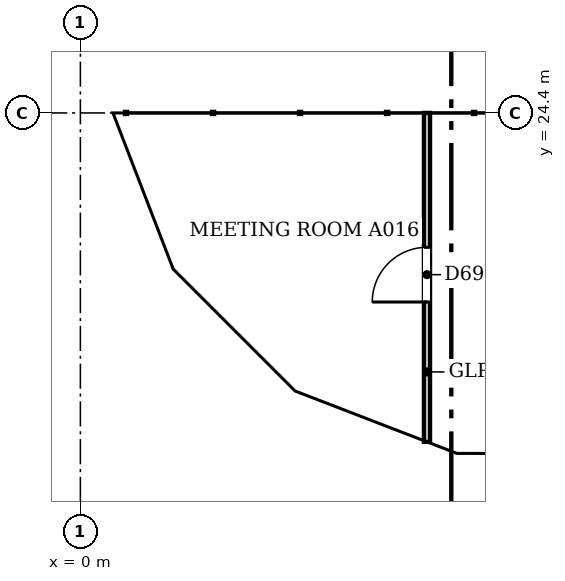
"""IFC4 building model, lengths in metres.
Left out: names, types, materials, properties, quantities, classifications, styles, units other than length and angle.
Written with IfcOpenShell. Run it as: python <this file> out.ifc"""

import sys

from ifc_helpers import new_model, si_unit, direction, frame, frame_2d, origin, place, context, subcontext, project, spatial, polyline, rectangle, outline, extrude, faceted_brep, source, transform, mapped, element, fill, save


model = new_model("IFC4")
c1 = context("Model", 3, precision=1e-05, world=origin(), true_north=direction((0.0, 1.0)))
c2 = subcontext(c1, "Body", "Model", "MODEL_VIEW")
j1 = project(units=[si_unit("LENGTHUNIT", "METRE"), si_unit("PLANEANGLEUNIT", "RADIAN")], contexts=[c1])
p1 = place(None, origin())
s1 = spatial("IfcSite", under=j1, at=p1, CompositionType="ELEMENT")
p2 = place(p1, origin())
s2 = spatial("IfcBuilding", under=s1, at=p2, CompositionType="ELEMENT")
p3 = place(p2, frame((0.0, 0.0, 124.0)))
s3 = spatial("IfcBuildingStorey", under=s2, at=p3, CompositionType="ELEMENT", Elevation=124.0)
m1 = source(origin(), c2, "Body", "Brep", [
    faceted_brep([(3.003, -0.25, 0.0), (3.05, -0.25, 0.06), (3.05, -0.25, 7.54), (3.003, -0.25, 7.6), (0.0, -0.25, 3.8), (0.0, 0.25, 3.8), (2.957, 0.25, 7.541), (2.957, 0.25, 0.059), (3.003, 0.0, 0.0), (3.003, 0.0, 7.6)], [[[0, 1, 2, 3, 4]], [[5, 6, 7]], [[1, 0, 8]], [[9, 3, 2]], [[6, 5, 4, 3, 9]], [[5, 7, 8, 0, 4]], [[1, 8, 7, 6, 9, 2]]]),
])
p4 = place(p3, frame((0.25, 27.45, -3.8), z_axis=(0.0, 0.0, 1.0), x_axis=(0.0, -1.0, 0.0)))
e1 = element("IfcWall", 1, at=p4, inside=s3, PredefinedType="SOLIDWALL", context=c2, shape_type="MappedRepresentation", body=[
    mapped(m1, transform((0.0, 0.0, 0.0), scale=1.0)),
])
m2 = source(origin(), c2, "Body", "SweptSolid", [
    extrude(outline(polyline([(2.803, 6.944), (0.319, 3.8), (2.803, 0.656), (2.803, 6.944)])), frame((0.0, 0.26, 0.0), z_axis=(0.0, -1.0, 0.0), x_axis=(1.0, 0.0, 0.0)), (0.0, 0.0, 1.0), 0.52),
])
p5 = place(p4, origin())
e2 = element("IfcOpeningElement", 2, at=p5, cuts=e1, PredefinedType="OPENING", context=c2, shape_type="MappedRepresentation", body=[
    mapped(m2, transform((0.0, 0.0, 0.0), scale=1.0)),
])
m3 = source(origin(), c2, "Body", "Brep", [
    faceted_brep([(0.047, -0.25, 0.0), (2.997, -0.25, 3.8), (0.047, -0.25, 7.6), (0.0, -0.25, 7.541), (0.0, -0.25, 0.059), (0.093, 0.25, 7.54), (2.944, 0.25, 3.868), (2.944, 0.25, 3.732), (0.093, 0.25, 0.06), (2.997, 0.0, 3.8), (0.047, 0.0, 0.0), (0.047, 0.0, 7.6)], [[[0, 1, 2, 3, 4]], [[5, 6, 7, 8]], [[8, 7, 9, 1, 0, 10]], [[6, 5, 11, 2, 1, 9]], [[3, 2, 11]], [[10, 0, 4]], [[8, 10, 4, 3, 11, 5]], [[9, 7, 6]]]),
])
p6 = place(p3, frame((0.233, 24.49, -3.8), z_axis=(0.0, 0.0, 1.0), x_axis=(0.359901446078, -0.932990326376, 0.0)))
e3 = element("IfcWall", 3, at=p6, inside=s3, PredefinedType="SOLIDWALL", context=c2, shape_type="MappedRepresentation", body=[
    mapped(m3, transform((0.0, 0.0, 0.0), scale=1.0)),
])
m4 = source(origin(), c2, "Body", "SweptSolid", [
    extrude(outline(polyline([(0.247, 0.665), (2.681, 3.8), (0.247, 6.935), (0.247, 0.665)])), frame((0.0, 0.26, 0.0), z_axis=(0.0, -1.0, 0.0), x_axis=(1.0, 0.0, 0.0)), (0.0, 0.0, 1.0), 0.52),
])
p7 = place(p6, origin())
e4 = element("IfcOpeningElement", 4, at=p7, cuts=e3, PredefinedType="OPENING", context=c2, shape_type="MappedRepresentation", body=[
    mapped(m4, transform((0.0, 0.0, 0.0), scale=1.0)),
])
m5 = source(origin(), c2, "Body", "Brep", [
    faceted_brep([(2.944, -0.25, 0.0), (2.997, -0.25, 0.068), (2.997, -0.25, 7.532), (2.944, -0.25, 7.6), (0.0, -0.25, 3.8), (0.053, 0.25, 3.868), (2.891, 0.25, 7.532), (2.891, 0.25, 0.068), (0.053, 0.25, 3.732), (2.944, 0.0, 0.0), (2.944, 0.0, 7.6), (0.0, 0.0, 3.8)], [[[0, 1, 2, 3, 4]], [[5, 6, 7, 8]], [[1, 0, 9]], [[10, 3, 2]], [[6, 5, 11, 4, 3, 10]], [[8, 7, 9, 0, 4, 11]], [[8, 11, 5]], [[1, 9, 7, 6, 10, 2]]]),
])
p8 = place(p3, frame((1.312, 21.694, -3.8), z_axis=(0.0, 0.0, 1.0), x_axis=(0.707066050402, -0.707147509625, 0.0)))
e5 = element("IfcWall", 5, at=p8, inside=s3, PredefinedType="SOLIDWALL", context=c2, shape_type="MappedRepresentation", body=[
    mapped(m5, transform((0.0, 0.0, 0.0), scale=1.0)),
])
m6 = source(origin(), c2, "Body", "SweptSolid", [
    extrude(outline(polyline([(2.744, 6.934), (0.316, 3.8), (2.744, 0.666), (2.744, 6.934)])), frame((0.0, 0.26, 0.0), z_axis=(0.0, -1.0, 0.0), x_axis=(1.0, 0.0, 0.0)), (0.0, 0.0, 1.0), 0.52),
])
p9 = place(p8, origin())
e6 = element("IfcOpeningElement", 6, at=p9, cuts=e5, PredefinedType="OPENING", context=c2, shape_type="MappedRepresentation", body=[
    mapped(m6, transform((0.0, 0.0, 0.0), scale=1.0)),
])
m7 = source(origin(), c2, "Body", "Brep", [
    faceted_brep([(0.053, -0.25, 0.0), (3.003, -0.25, 3.8), (0.053, -0.25, 7.6), (0.0, -0.25, 7.532), (0.0, -0.25, 0.068), (0.106, 0.25, 7.532), (2.957, 0.25, 3.86), (2.957, 0.25, 3.74), (0.106, 0.25, 0.068), (3.003, 0.0, 3.8), (0.053, 0.0, 0.0), (0.053, 0.0, 7.6)], [[[0, 1, 2, 3, 4]], [[5, 6, 7, 8]], [[8, 7, 9, 1, 0, 10]], [[6, 5, 11, 2, 1, 9]], [[3, 2, 11]], [[10, 0, 4]], [[8, 10, 4, 3, 11, 5]], [[9, 7, 6]]]),
])
p10 = place(p3, frame((3.344, 19.631, -3.8), z_axis=(0.0, 0.0, 1.0), x_axis=(0.933007896601, -0.359855894603, 0.0)))
e7 = element("IfcWall", 7, at=p10, inside=s3, PredefinedType="SOLIDWALL", context=c2, shape_type="MappedRepresentation", body=[
    mapped(m7, transform((0.0, 0.0, 0.0), scale=1.0)),
])
m8 = source(origin(), c2, "Body", "SweptSolid", [
    extrude(outline(polyline([(0.253, 0.665), (2.687, 3.8), (0.253, 6.935), (0.253, 0.665)])), frame((0.0, 0.26, 0.0), z_axis=(0.0, -1.0, 0.0), x_axis=(1.0, 0.0, 0.0)), (0.0, 0.0, 1.0), 0.52),
])
p11 = place(p10, origin())
e8 = element("IfcOpeningElement", 8, at=p11, cuts=e7, PredefinedType="OPENING", context=c2, shape_type="MappedRepresentation", body=[
    mapped(m8, transform((0.0, 0.0, 0.0), scale=1.0)),
])
m9 = source(origin(), c2, "Body", "Brep", [
    faceted_brep([(3.003, -0.25, 0.0), (6.053, -0.25, 3.8), (3.003, -0.25, 7.6), (0.0, -0.25, 3.8), (0.047, 0.25, 3.859), (3.003, 0.25, 7.6), (6.053, 0.25, 3.8), (3.003, 0.25, 0.0), (0.047, 0.25, 3.741), (0.0, 0.0, 3.8)], [[[0, 1, 2, 3]], [[4, 5, 6, 7, 8]], [[7, 6, 1, 0]], [[6, 5, 2, 1]], [[5, 4, 9, 3, 2]], [[8, 7, 0, 3, 9]], [[8, 9, 4]]]),
])
p12 = place(p3, frame((6.146, 18.55, -3.8), z_axis=(0.0, 0.0, 1.0), x_axis=(1.0, 0.0, 0.0)))
e9 = element("IfcWall", 9, at=p12, inside=s3, PredefinedType="SOLIDWALL", context=c2, shape_type="MappedRepresentation", body=[
    mapped(m9, transform((0.0, 0.0, 0.0), scale=1.0)),
])
m10 = source(origin(), c2, "Body", "SweptSolid", [
    extrude(outline(polyline([(3.005, 0.401), (5.733, 3.8), (3.005, 7.199), (0.319, 3.8), (3.005, 0.401)])), frame((0.0, 0.26, 0.0), z_axis=(0.0, -1.0, 0.0), x_axis=(1.0, 0.0, 0.0)), (0.0, 0.0, 1.0), 0.52),
])
p13 = place(p12, origin())
e10 = element("IfcOpeningElement", 10, at=p13, cuts=e9, PredefinedType="OPENING", context=c2, shape_type="MappedRepresentation", body=[
    mapped(m10, transform((0.0, 0.0, 0.0), scale=1.0)),
])
p14 = place(p2, frame((0.0, 0.0, 127.8)))
s4 = spatial("IfcBuildingStorey", under=s2, at=p14, CompositionType="ELEMENT", Elevation=127.8)
m11 = source(origin(), c2, "Body", "Brep", [
    faceted_brep([(3.05, -0.25, 0.0), (6.053, -0.25, 3.8), (3.05, -0.25, 7.6), (0.0, -0.25, 3.8), (0.0, 0.25, 3.8), (3.05, 0.25, 7.6), (6.007, 0.25, 3.859), (6.007, 0.25, 3.741), (3.05, 0.25, 0.0), (6.053, 0.0, 3.8)], [[[0, 1, 2, 3]], [[4, 5, 6, 7, 8]], [[8, 7, 9, 1, 0]], [[6, 5, 2, 1, 9]], [[5, 4, 3, 2]], [[4, 8, 0, 3]], [[9, 7, 6]]]),
])
p15 = place(p14, frame((0.25, 30.5, -3.8), z_axis=(0.0, 0.0, 1.0), x_axis=(0.0, -1.0, 0.0)))
e11 = element("IfcWall", 11, at=p15, inside=s4, PredefinedType="SOLIDWALL", context=c2, shape_type="MappedRepresentation", body=[
    mapped(m11, transform((0.0, 0.0, 0.0), scale=1.0)),
])
m12 = source(origin(), c2, "Body", "SweptSolid", [
    extrude(outline(polyline([(3.049, 0.401), (5.735, 3.8), (3.049, 7.199), (0.321, 3.8), (3.049, 0.401)])), frame((0.0, 0.26, 0.0), z_axis=(0.0, -1.0, 0.0), x_axis=(1.0, 0.0, 0.0)), (0.0, 0.0, 1.0), 0.52),
])
p16 = place(p15, origin())
e12 = element("IfcOpeningElement", 12, at=p16, cuts=e11, PredefinedType="OPENING", context=c2, shape_type="MappedRepresentation", body=[
    mapped(m12, transform((0.0, 0.0, 0.0), scale=1.0)),
])
m13 = source(origin(), c2, "Body", "Brep", [
    faceted_brep([(2.95, -0.25, 0.0), (3.003, -0.25, 0.068), (3.003, -0.25, 7.532), (2.95, -0.25, 7.6), (0.0, -0.25, 3.8), (0.047, 0.25, 3.86), (2.898, 0.25, 7.532), (2.898, 0.25, 0.068), (0.047, 0.25, 3.74), (2.95, 0.0, 0.0), (2.95, 0.0, 7.6), (0.0, 0.0, 3.8)], [[[0, 1, 2, 3, 4]], [[5, 6, 7, 8]], [[1, 0, 9]], [[10, 3, 2]], [[6, 5, 11, 4, 3, 10]], [[8, 7, 9, 0, 4, 11]], [[8, 11, 5]], [[1, 9, 7, 6, 10, 2]]]),
])
p17 = place(p14, frame((0.25, 24.447, -3.8), z_axis=(0.0, 0.0, 1.0), x_axis=(0.35992665181, -0.932980602862, 0.0)))
e13 = element("IfcWall", 13, at=p17, inside=s4, PredefinedType="SOLIDWALL", context=c2, shape_type="MappedRepresentation", body=[
    mapped(m13, transform((0.0, 0.0, 0.0), scale=1.0)),
])
m14 = source(origin(), c2, "Body", "SweptSolid", [
    extrude(outline(polyline([(2.75, 6.935), (0.316, 3.8), (2.75, 0.665), (2.75, 6.935)])), frame((0.0, 0.26, 0.0), z_axis=(0.0, -1.0, 0.0), x_axis=(1.0, 0.0, 0.0)), (0.0, 0.0, 1.0), 0.52),
])
p18 = place(p17, origin())
e14 = element("IfcOpeningElement", 14, at=p18, cuts=e13, PredefinedType="OPENING", context=c2, shape_type="MappedRepresentation", body=[
    mapped(m14, transform((0.0, 0.0, 0.0), scale=1.0)),
])
m15 = source(origin(), c2, "Body", "Brep", [
    faceted_brep([(0.053, -0.25, 0.0), (2.997, -0.25, 3.8), (0.053, -0.25, 7.6), (0.0, -0.25, 7.532), (0.0, -0.25, 0.068), (0.106, 0.25, 7.532), (2.944, 0.25, 3.868), (2.944, 0.25, 3.732), (0.106, 0.25, 0.068), (2.997, 0.0, 3.8), (0.053, 0.0, 0.0), (0.053, 0.0, 7.6)], [[[0, 1, 2, 3, 4]], [[5, 6, 7, 8]], [[8, 7, 9, 1, 0, 10]], [[6, 5, 11, 2, 1, 9]], [[3, 2, 11]], [[10, 0, 4]], [[8, 10, 4, 3, 11, 5]], [[9, 7, 6]]]),
])
p19 = place(p14, frame((1.274, 21.731, -3.8), z_axis=(0.0, 0.0, 1.0), x_axis=(0.707147509625, -0.707066050402, 0.0)))
e15 = element("IfcWall", 15, at=p19, inside=s4, PredefinedType="SOLIDWALL", context=c2, shape_type="MappedRepresentation", body=[
    mapped(m15, transform((0.0, 0.0, 0.0), scale=1.0)),
])
m16 = source(origin(), c2, "Body", "SweptSolid", [
    extrude(outline(polyline([(0.253, 0.666), (2.681, 3.8), (0.253, 6.934), (0.253, 0.666)])), frame((0.0, 0.26, 0.0), z_axis=(0.0, -1.0, 0.0), x_axis=(1.0, 0.0, 0.0)), (0.0, 0.0, 1.0), 0.52),
])
p20 = place(p19, origin())
e16 = element("IfcOpeningElement", 16, at=p20, cuts=e15, PredefinedType="OPENING", context=c2, shape_type="MappedRepresentation", body=[
    mapped(m16, transform((0.0, 0.0, 0.0), scale=1.0)),
])
m17 = source(origin(), c2, "Body", "Brep", [
    faceted_brep([(2.95, -0.25, 0.0), (2.997, -0.25, 0.059), (2.997, -0.25, 7.541), (2.95, -0.25, 7.6), (0.0, -0.25, 3.8), (0.053, 0.25, 3.868), (2.904, 0.25, 7.54), (2.904, 0.25, 0.06), (0.053, 0.25, 3.732), (2.95, 0.0, 0.0), (2.95, 0.0, 7.6), (0.0, 0.0, 3.8)], [[[0, 1, 2, 3, 4]], [[5, 6, 7, 8]], [[1, 0, 9]], [[10, 3, 2]], [[6, 5, 11, 4, 3, 10]], [[8, 7, 9, 0, 4, 11]], [[8, 11, 5]], [[1, 9, 7, 6, 10, 2]]]),
])
p21 = place(p14, frame((3.394, 19.612, -3.8), z_axis=(0.0, 0.0, 1.0), x_axis=(0.932990326376, -0.359901446078, 0.0)))
e17 = element("IfcWall", 17, at=p21, inside=s4, PredefinedType="SOLIDWALL", context=c2, shape_type="MappedRepresentation", body=[
    mapped(m17, transform((0.0, 0.0, 0.0), scale=1.0)),
])
p22 = place(p21, origin())
e18 = element("IfcOpeningElement", 18, at=p22, cuts=e17, PredefinedType="OPENING", context=c2, shape_type="MappedRepresentation", body=[
    mapped(m14, transform((0.0, 0.0, 0.0), scale=1.0)),
])
m18 = source(origin(), c2, "Body", "Brep", [
    faceted_brep([(0.047, -0.25, 0.0), (3.05, -0.25, 3.8), (0.047, -0.25, 7.6), (0.0, -0.25, 7.54), (0.0, -0.25, 0.06), (0.093, 0.25, 7.541), (3.05, 0.25, 3.8), (0.093, 0.25, 0.059), (0.047, 0.0, 0.0), (0.047, 0.0, 7.6)], [[[0, 1, 2, 3, 4]], [[5, 6, 7]], [[7, 6, 1, 0, 8]], [[6, 5, 9, 2, 1]], [[3, 2, 9]], [[8, 0, 4]], [[7, 8, 4, 3, 9, 5]]]),
])
p23 = place(p14, frame((6.1, 18.55, -3.8), z_axis=(0.0, 0.0, 1.0), x_axis=(1.0, 0.0, 0.0)))
e19 = element("IfcWall", 19, at=p23, inside=s4, PredefinedType="SOLIDWALL", context=c2, shape_type="MappedRepresentation", body=[
    mapped(m18, transform((0.0, 0.0, 0.0), scale=1.0)),
])
m19 = source(origin(), c2, "Body", "SweptSolid", [
    extrude(outline(polyline([(0.247, 0.656), (2.731, 3.8), (0.247, 6.944), (0.247, 0.656)])), frame((0.0, 0.26, 0.0), z_axis=(0.0, -1.0, 0.0), x_axis=(1.0, 0.0, 0.0)), (0.0, 0.0, 1.0), 0.52),
])
p24 = place(p23, origin())
e20 = element("IfcOpeningElement", 20, at=p24, cuts=e19, PredefinedType="OPENING", context=c2, shape_type="MappedRepresentation", body=[
    mapped(m19, transform((0.0, 0.0, 0.0), scale=1.0)),
])
p25 = place(p3, frame((5.7, 18.99, 0.0), z_axis=(0.0, 0.0, 1.0), x_axis=(0.0, 1.0, 0.0)))
e21 = element("IfcWall", 21, at=p25, inside=s3, PredefinedType="PARTITIONING", context=c2, shape_type="SweptSolid", body=[
    extrude(rectangle(XDim=5.41, YDim=0.1, at=frame_2d((2.705, 0.0))), origin(), (0.0, 0.0, 1.0), 3.067),
])
m20 = source(origin(), c2, "Body", "SweptSolid", [
    extrude(rectangle(XDim=0.9, YDim=2.1, at=frame_2d((0.45, 1.05))), frame((0.0, 0.06, 0.0), z_axis=(0.0, -1.0, 0.0), x_axis=(1.0, 0.0, 0.0)), (0.0, 0.0, 1.0), 0.12),
])
p26 = place(p25, frame((2.3, 0.0, 0.0)))
e22 = element("IfcOpeningElement", 22, at=p26, cuts=e21, PredefinedType="OPENING", context=c2, shape_type="MappedRepresentation", body=[
    mapped(m20, transform((0.0, 0.0, 0.0), scale=1.0)),
])
m21 = source(origin(), c2, "Body", "SweptSolid", [
    extrude(rectangle(XDim=0.9, YDim=2.1, at=frame_2d((0.45, 1.05))), frame((0.0, 0.025, 0.0), z_axis=(0.0, -1.0, 0.0), x_axis=(1.0, 0.0, 0.0)), (0.0, 0.0, 1.0), 0.05),
])
p27 = place(p26, origin())
e23 = element("IfcDoor", 23, at=p27, inside=s3, OperationType="SINGLE_SWING_LEFT", PredefinedType="DOOR", context=c2, shape_type="MappedRepresentation", body=[
    mapped(m21, transform((0.0, 0.0, 0.0), scale=1.0)),
])
fill(e22, e23)
save(model, sys.argv[1])
